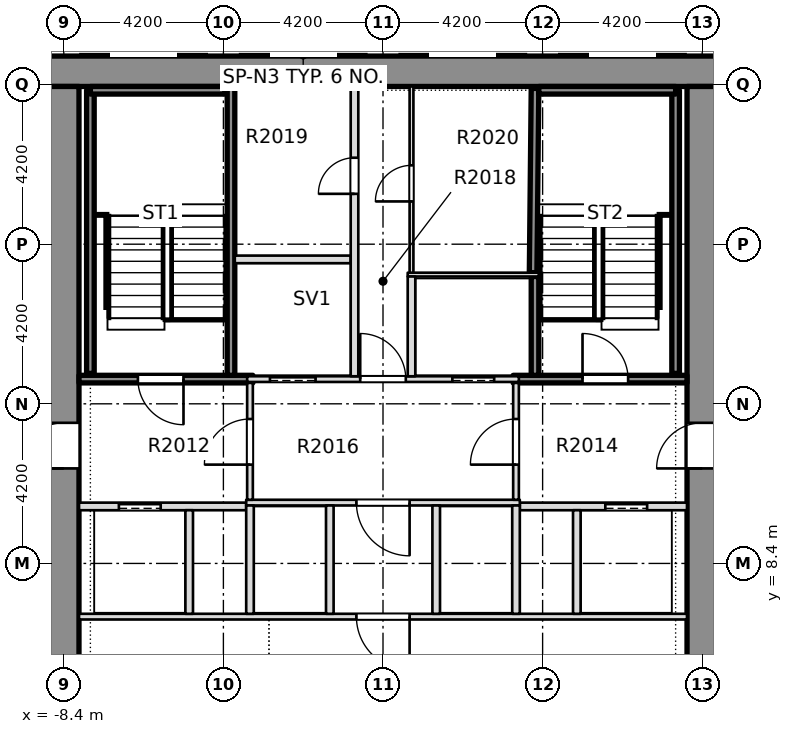
"""IFC4 building model, lengths in metres.
Left out: names, types, materials, properties, quantities, classifications, styles, units other than length and angle.
Written with IfcOpenShell. Run it as: python <this file> out.ifc"""

import sys

from ifc_helpers import new_model, si_unit, direction, frame, frame_2d, origin, place, context, subcontext, project, spatial, rectangle, extrude, element, fill, save


model = new_model("IFC4")
c1 = context("Model", 3, precision=1e-05, world=origin(), true_north=direction((0.0, 1.0)))
c2 = subcontext(c1, "Body", "Model", "MODEL_VIEW")
j1 = project(units=[si_unit("LENGTHUNIT", "METRE"), si_unit("PLANEANGLEUNIT", "RADIAN")], contexts=[c1])
p1 = place(None, origin())
s1 = spatial("IfcSite", under=j1, at=p1, CompositionType="ELEMENT")
p2 = place(p1, origin())
s2 = spatial("IfcBuilding", under=s1, at=p2, CompositionType="ELEMENT")
p3 = place(p2, frame((0.0, 0.0, 83.85)))
s3 = spatial("IfcBuildingStorey", under=s2, at=p3, CompositionType="ELEMENT", Elevation=83.85)
p4 = place(p3, frame((-11.8, 21.35, -0.32), z_axis=(0.0, 0.0, 1.0), x_axis=(1.0, 0.0, 0.0)))
e1 = element("IfcWall", 1, at=p4, inside=s3, PredefinedType="SHEAR", context=c2, shape_type="SweptSolid", body=[
    extrude(rectangle(XDim=23.6, YDim=0.8, at=frame_2d((11.8, 0.0))), origin(), (0.0, 0.0, 1.0), 3.45),
])
p5 = place(p3, frame((-8.4, -7.6, -0.32), z_axis=(0.0, 0.0, 1.0), x_axis=(0.0, 1.0, 0.0)))
e2 = element("IfcWall", 2, at=p5, inside=s3, PredefinedType="SHEAR", context=c2, shape_type="SweptSolid", body=[
    extrude(rectangle(XDim=28.55, YDim=0.8, at=frame_2d((14.275, 0.0))), origin(), (0.0, 0.0, 1.0), 3.45),
])
p6 = place(p5, frame((18.5, 0.0, 0.32)))
e3 = element("IfcOpeningElement", 3, at=p6, cuts=e2, PredefinedType="OPENING", context=c2, shape_type="SweptSolid", body=[
    extrude(rectangle(XDim=1.2, YDim=2.1, at=frame_2d((0.6, 1.05))), frame((0.0, 0.41, 0.0), z_axis=(0.0, -1.0, 0.0), x_axis=(1.0, 0.0, 0.0)), (0.0, 0.0, 1.0), 0.82),
])
p7 = place(p3, frame((8.4, -7.6, -0.32), z_axis=(0.0, 0.0, 1.0), x_axis=(0.0, 1.0, 0.0)))
e4 = element("IfcWall", 4, at=p7, inside=s3, PredefinedType="SHEAR", context=c2, shape_type="SweptSolid", body=[
    extrude(rectangle(XDim=28.55, YDim=0.8, at=frame_2d((14.275, 0.0))), origin(), (0.0, 0.0, 1.0), 3.45),
])
p8 = place(p7, frame((18.5, 0.0, 0.32)))
e5 = element("IfcOpeningElement", 5, at=p8, cuts=e4, PredefinedType="OPENING", context=c2, shape_type="SweptSolid", body=[
    extrude(rectangle(XDim=1.2, YDim=2.1, at=frame_2d((0.6, 1.05))), frame((0.0, 0.41, 0.0), z_axis=(0.0, -1.0, 0.0), x_axis=(1.0, 0.0, 0.0)), (0.0, 0.0, 1.0), 0.82),
])
p9 = place(p3, frame((-7.999, 7.0, 0.0), z_axis=(0.0, 0.0, 1.0), x_axis=(1.0, 0.0, 0.0)))
e6 = element("IfcWall", 6, at=p9, inside=s3, PredefinedType="PARTITIONING", context=c2, shape_type="SweptSolid", body=[
    extrude(rectangle(XDim=15.998, YDim=0.15, at=frame_2d((7.999, 0.0))), origin(), (0.0, 0.0, 1.0), 3.13),
])
p10 = place(p9, frame((7.299, 0.0, 0.0)))
e7 = element("IfcOpeningElement", 7, at=p10, cuts=e6, PredefinedType="OPENING", context=c2, shape_type="SweptSolid", body=[
    extrude(rectangle(XDim=1.4, YDim=2.1, at=frame_2d((0.7, 1.05))), frame((0.0, 0.085, 0.0), z_axis=(0.0, -1.0, 0.0), x_axis=(1.0, 0.0, 0.0)), (0.0, 0.0, 1.0), 0.17),
])
p11 = place(p3, frame((-7.999, 9.9, 0.0), z_axis=(0.0, 0.0, 1.0), x_axis=(1.0, 0.0, 0.0)))
e8 = element("IfcWall", 8, at=p11, inside=s3, PredefinedType="PARTITIONING", context=c2, shape_type="SweptSolid", body=[
    extrude(rectangle(XDim=4.399, YDim=0.2, at=frame_2d((2.199, 0.0))), origin(), (0.0, 0.0, 1.0), 3.13),
])
p12 = place(p11, frame((1.049, 0.0, 0.0)))
e9 = element("IfcOpeningElement", 9, at=p12, cuts=e8, PredefinedType="OPENING", context=c2, shape_type="SweptSolid", body=[
    extrude(rectangle(XDim=1.1, YDim=2.1, at=frame_2d((0.55, 1.05))), frame((0.0, 0.11, 0.0), z_axis=(0.0, -1.0, 0.0), x_axis=(1.0, 0.0, 0.0)), (0.0, 0.0, 1.0), 0.22),
])
p13 = place(p3, frame((3.6, 9.9, 0.0), z_axis=(0.0, 0.0, 1.0), x_axis=(1.0, 0.0, 0.0)))
e10 = element("IfcWall", 10, at=p13, inside=s3, PredefinedType="PARTITIONING", context=c2, shape_type="SweptSolid", body=[
    extrude(rectangle(XDim=4.399, YDim=0.2, at=frame_2d((2.199, 0.0))), origin(), (0.0, 0.0, 1.0), 3.13),
])
p14 = place(p13, frame((2.25, 0.0, 0.0)))
e11 = element("IfcOpeningElement", 11, at=p14, cuts=e10, PredefinedType="OPENING", context=c2, shape_type="SweptSolid", body=[
    extrude(rectangle(XDim=1.1, YDim=2.1, at=frame_2d((0.55, 1.05))), frame((0.0, 0.11, 0.0), z_axis=(0.0, -1.0, 0.0), x_axis=(1.0, 0.0, 0.0)), (0.0, 0.0, 1.0), 0.22),
])
p15 = place(p3, frame((-3.6, 10.0, 0.0), z_axis=(0.0, 0.0, 1.0), x_axis=(1.0, 0.0, 0.0)))
e12 = element("IfcWall", 12, at=p15, inside=s3, PredefinedType="PARTITIONING", context=c2, shape_type="SweptSolid", body=[
    extrude(rectangle(XDim=7.2, YDim=0.15, at=frame_2d((3.6, 0.0))), origin(), (0.0, 0.0, 1.0), 3.13),
])
p16 = place(p15, frame((2.9, 0.0, 0.0)))
e13 = element("IfcOpeningElement", 13, at=p16, cuts=e12, PredefinedType="OPENING", context=c2, shape_type="SweptSolid", body=[
    extrude(rectangle(XDim=1.4, YDim=2.1, at=frame_2d((0.7, 1.05))), frame((0.0, 0.085, 0.0), z_axis=(0.0, -1.0, 0.0), x_axis=(1.0, 0.0, 0.0)), (0.0, 0.0, 1.0), 0.17),
])
p17 = place(p3, frame((-7.999, 13.25, 0.0), z_axis=(0.0, 0.0, 1.0), x_axis=(1.0, 0.0, 0.0)))
e14 = element("IfcWall", 14, at=p17, inside=s3, PredefinedType="SOLIDWALL", context=c2, shape_type="SweptSolid", body=[
    extrude(rectangle(XDim=4.574, YDim=0.2, at=frame_2d((2.287, 0.0))), origin(), (0.0, 0.0, 1.0), 3.13),
])
p18 = place(p17, frame((1.549, 0.0, 0.0)))
e15 = element("IfcOpeningElement", 15, at=p18, cuts=e14, PredefinedType="OPENING", context=c2, shape_type="SweptSolid", body=[
    extrude(rectangle(XDim=1.2, YDim=2.1, at=frame_2d((0.6, 1.05))), frame((0.0, 0.11, 0.0), z_axis=(0.0, -1.0, 0.0), x_axis=(1.0, 0.0, 0.0)), (0.0, 0.0, 1.0), 0.22),
])
p19 = place(p3, frame((-3.575, 13.25, 0.0), z_axis=(0.0, 0.0, 1.0), x_axis=(1.0, 0.0, 0.0)))
e16 = element("IfcWall", 16, at=p19, inside=s3, PredefinedType="PARTITIONING", context=c2, shape_type="SweptSolid", body=[
    extrude(rectangle(XDim=7.15, YDim=0.15, at=frame_2d((3.575, 0.0))), origin(), (0.0, 0.0, 1.0), 3.13),
])
p20 = place(p19, frame((0.6, 0.0, 0.0)))
e17 = element("IfcOpeningElement", 17, at=p20, cuts=e16, PredefinedType="OPENING", context=c2, shape_type="SweptSolid", body=[
    extrude(rectangle(XDim=1.2, YDim=2.1, at=frame_2d((0.6, 1.05))), frame((0.0, 0.085, 0.0), z_axis=(0.0, -1.0, 0.0), x_axis=(1.0, 0.0, 0.0)), (0.0, 0.0, 1.0), 0.17),
])
p21 = place(p19, frame((5.4, 0.0, 0.0)))
e18 = element("IfcOpeningElement", 18, at=p21, cuts=e16, PredefinedType="OPENING", context=c2, shape_type="SweptSolid", body=[
    extrude(rectangle(XDim=1.1, YDim=2.1, at=frame_2d((0.55, 1.05))), frame((0.0, 0.085, 0.0), z_axis=(0.0, -1.0, 0.0), x_axis=(1.0, 0.0, 0.0)), (0.0, 0.0, 1.0), 0.17),
])
p22 = place(p19, frame((2.975, 0.0, 0.0)))
e19 = element("IfcOpeningElement", 19, at=p22, cuts=e16, PredefinedType="OPENING", context=c2, shape_type="SweptSolid", body=[
    extrude(rectangle(XDim=1.2, YDim=2.1, at=frame_2d((0.6, 1.05))), frame((0.0, 0.085, 0.0), z_axis=(0.0, -1.0, 0.0), x_axis=(1.0, 0.0, 0.0)), (0.0, 0.0, 1.0), 0.17),
])
p23 = place(p3, frame((3.425, 13.25, 0.0), z_axis=(0.0, 0.0, 1.0), x_axis=(1.0, 0.0, 0.0)))
e20 = element("IfcWall", 20, at=p23, inside=s3, PredefinedType="SOLIDWALL", context=c2, shape_type="SweptSolid", body=[
    extrude(rectangle(XDim=4.574, YDim=0.2, at=frame_2d((2.287, 0.0))), origin(), (0.0, 0.0, 1.0), 3.13),
])
p24 = place(p23, frame((1.825, 0.0, 0.0)))
e21 = element("IfcOpeningElement", 21, at=p24, cuts=e20, PredefinedType="OPENING", context=c2, shape_type="SweptSolid", body=[
    extrude(rectangle(XDim=1.2, YDim=2.1, at=frame_2d((0.6, 1.05))), frame((0.0, 0.11, 0.0), z_axis=(0.0, -1.0, 0.0), x_axis=(1.0, 0.0, 0.0)), (0.0, 0.0, 1.0), 0.22),
])
p25 = place(p3, frame((0.65, 16.0, 0.0), z_axis=(0.0, 0.0, 1.0), x_axis=(1.0, 0.0, 0.0)))
e22 = element("IfcWall", 22, at=p25, inside=s3, PredefinedType="PARTITIONING", context=c2, shape_type="SweptSolid", body=[
    extrude(rectangle(XDim=3.45, YDim=0.1, at=frame_2d((1.725, 0.0))), origin(), (0.0, 0.0, 1.0), 3.13),
])
p26 = place(p3, frame((-3.9, 16.4, 0.0), z_axis=(0.0, 0.0, 1.0), x_axis=(1.0, 0.0, 0.0)))
e23 = element("IfcWall", 23, at=p26, inside=s3, PredefinedType="PARTITIONING", context=c2, shape_type="SweptSolid", body=[
    extrude(rectangle(XDim=3.05, YDim=0.2, at=frame_2d((1.525, 0.0))), origin(), (0.0, 0.0, 1.0), 3.13),
])
p27 = place(p3, frame((-5.1, 7.075, 0.0), z_axis=(0.0, 0.0, 1.0), x_axis=(0.0, 1.0, 0.0)))
e24 = element("IfcWall", 24, at=p27, inside=s3, PredefinedType="PARTITIONING", context=c2, shape_type="SweptSolid", body=[
    extrude(rectangle(XDim=2.725, YDim=0.2, at=frame_2d((1.363, 0.0))), origin(), (0.0, 0.0, 1.0), 3.13),
])
p28 = place(p3, frame((-4.0, 13.35, 0.0), z_axis=(0.0, 0.0, 1.0), x_axis=(0.0, 1.0, 0.0)))
e25 = element("IfcWall", 25, at=p28, inside=s3, PredefinedType="SOLIDWALL", context=c2, shape_type="SweptSolid", body=[
    extrude(rectangle(XDim=7.599, YDim=0.2, at=frame_2d((3.799, 0.0))), origin(), (0.0, 0.0, 1.0), 3.13),
])
p29 = place(p3, frame((-3.5, 7.075, 0.0), z_axis=(0.0, 0.0, 1.0), x_axis=(0.0, 1.0, 0.0)))
e26 = element("IfcWall", 26, at=p29, inside=s3, PredefinedType="PARTITIONING", context=c2, shape_type="SweptSolid", body=[
    extrude(rectangle(XDim=2.85, YDim=0.2, at=frame_2d((1.425, 0.0))), origin(), (0.0, 0.0, 1.0), 3.13),
])
p30 = place(p3, frame((-3.5, 10.075, 0.0), z_axis=(0.0, 0.0, 1.0), x_axis=(0.0, 1.0, 0.0)))
e27 = element("IfcWall", 27, at=p30, inside=s3, PredefinedType="PARTITIONING", context=c2, shape_type="SweptSolid", body=[
    extrude(rectangle(XDim=3.075, YDim=0.15, at=frame_2d((1.538, 0.0))), origin(), (0.0, 0.0, 1.0), 3.13),
])
p31 = place(p30, frame((0.925, 0.0, 0.0)))
e28 = element("IfcOpeningElement", 28, at=p31, cuts=e27, PredefinedType="OPENING", context=c2, shape_type="SweptSolid", body=[
    extrude(rectangle(XDim=1.2, YDim=2.1, at=frame_2d((0.6, 1.05))), frame((0.0, 0.085, 0.0), z_axis=(0.0, -1.0, 0.0), x_axis=(1.0, 0.0, 0.0)), (0.0, 0.0, 1.0), 0.17),
])
p32 = place(p3, frame((-1.4, 7.075, 0.0), z_axis=(0.0, 0.0, 1.0), x_axis=(0.0, 1.0, 0.0)))
e29 = element("IfcWall", 29, at=p32, inside=s3, PredefinedType="PARTITIONING", context=c2, shape_type="SweptSolid", body=[
    extrude(rectangle(XDim=2.85, YDim=0.2, at=frame_2d((1.425, 0.0))), origin(), (0.0, 0.0, 1.0), 3.13),
])
p33 = place(p3, frame((-0.75, 13.325, 0.0), z_axis=(0.0, 0.0, 1.0), x_axis=(0.0, 1.0, 0.0)))
e30 = element("IfcWall", 30, at=p33, inside=s3, PredefinedType="PARTITIONING", context=c2, shape_type="SweptSolid", body=[
    extrude(rectangle(XDim=7.624, YDim=0.2, at=frame_2d((3.812, 0.0))), origin(), (0.0, 0.0, 1.0), 3.13),
])
p34 = place(p33, frame((4.8, 0.0, 0.0)))
e31 = element("IfcOpeningElement", 31, at=p34, cuts=e30, PredefinedType="OPENING", context=c2, shape_type="SweptSolid", body=[
    extrude(rectangle(XDim=0.95, YDim=2.1, at=frame_2d((0.475, 1.05))), frame((0.0, 0.11, 0.0), z_axis=(0.0, -1.0, 0.0), x_axis=(1.0, 0.0, 0.0)), (0.0, 0.0, 1.0), 0.22),
])
p35 = place(p3, frame((0.75, 13.325, 0.0), z_axis=(0.0, 0.0, 1.0), x_axis=(0.0, 1.0, 0.0)))
e32 = element("IfcWall", 32, at=p35, inside=s3, PredefinedType="PARTITIONING", context=c2, shape_type="SweptSolid", body=[
    extrude(rectangle(XDim=2.625, YDim=0.2, at=frame_2d((1.312, 0.0))), origin(), (0.0, 0.0, 1.0), 3.13),
])
p36 = place(p3, frame((0.75, 16.05, 0.0), z_axis=(0.0, 0.0, 1.0), x_axis=(0.0, 1.0, 0.0)))
e33 = element("IfcWall", 33, at=p36, inside=s3, PredefinedType="PARTITIONING", context=c2, shape_type="SweptSolid", body=[
    extrude(rectangle(XDim=4.899, YDim=0.1, at=frame_2d((2.449, 0.0))), origin(), (0.0, 0.0, 1.0), 3.13),
])
p37 = place(p36, frame((1.875, 0.0, 0.0)))
e34 = element("IfcOpeningElement", 34, at=p37, cuts=e33, PredefinedType="OPENING", context=c2, shape_type="SweptSolid", body=[
    extrude(rectangle(XDim=0.95, YDim=2.1, at=frame_2d((0.475, 1.05))), frame((0.0, 0.06, 0.0), z_axis=(0.0, -1.0, 0.0), x_axis=(1.0, 0.0, 0.0)), (0.0, 0.0, 1.0), 0.12),
])
for number, where, z_axis, x_axis in (
    (35, (1.4, 7.075, 0.0), (0.0, 0.0, 1.0), (0.0, 1.0, 0.0)),
    (36, (3.5, 7.075, 0.0), (0.0, 0.0, 1.0), (0.0, 1.0, 0.0)),
):
    element("IfcWall", number, at=place(p3, frame(where, z_axis=z_axis, x_axis=x_axis)), inside=s3, PredefinedType="PARTITIONING", context=c2, shape_type="SweptSolid", body=[
        extrude(rectangle(XDim=2.85, YDim=0.2, at=frame_2d((1.425, 0.0))), origin(), (0.0, 0.0, 1.0), 3.13),
    ])
p38 = place(p3, frame((3.5, 10.075, 0.0), z_axis=(0.0, 0.0, 1.0), x_axis=(0.0, 1.0, 0.0)))
e37 = element("IfcWall", 37, at=p38, inside=s3, PredefinedType="PARTITIONING", context=c2, shape_type="SweptSolid", body=[
    extrude(rectangle(XDim=3.075, YDim=0.15, at=frame_2d((1.538, 0.0))), origin(), (0.0, 0.0, 1.0), 3.13),
])
p39 = place(p38, frame((0.925, 0.0, 0.0)))
e38 = element("IfcOpeningElement", 38, at=p39, cuts=e37, PredefinedType="OPENING", context=c2, shape_type="SweptSolid", body=[
    extrude(rectangle(XDim=1.2, YDim=2.1, at=frame_2d((0.6, 1.05))), frame((0.0, 0.085, 0.0), z_axis=(0.0, -1.0, 0.0), x_axis=(1.0, 0.0, 0.0)), (0.0, 0.0, 1.0), 0.17),
])
p40 = place(p3, frame((4.0, 13.35, 0.0), z_axis=(0.0, 0.0, 1.0), x_axis=(0.0, 1.0, 0.0)))
e39 = element("IfcWall", 39, at=p40, inside=s3, PredefinedType="SOLIDWALL", context=c2, shape_type="SweptSolid", body=[
    extrude(rectangle(XDim=2.6, YDim=0.2, at=frame_2d((1.3, 0.0))), origin(), (0.0, 0.0, 1.0), 3.13),
])
p41 = place(p3, frame((3.95, 16.05, 0.0), z_axis=(0.0, 0.0, 1.0), x_axis=(0.01032118628, 0.999946735138, 0.0)))
e40 = element("IfcWall", 40, at=p41, inside=s3, PredefinedType="SOLIDWALL", context=c2, shape_type="SweptSolid", body=[
    extrude(rectangle(XDim=4.849, YDim=0.2, at=frame_2d((2.425, 0.0))), origin(), (0.0, 0.0, 1.0), 3.13),
])
p42 = place(p3, frame((5.1, 7.075, 0.0), z_axis=(0.0, 0.0, 1.0), x_axis=(0.0, 1.0, 0.0)))
e41 = element("IfcWall", 41, at=p42, inside=s3, PredefinedType="PARTITIONING", context=c2, shape_type="SweptSolid", body=[
    extrude(rectangle(XDim=2.725, YDim=0.2, at=frame_2d((1.363, 0.0))), origin(), (0.0, 0.0, 1.0), 3.13),
])
p43 = place(p3, frame((-7.7, 13.4, 0.0), z_axis=(0.0, 0.0, 1.0), x_axis=(0.0, 1.0, 0.0)))
e42 = element("IfcWall", 42, at=p43, inside=s3, PredefinedType="SOLIDWALL", context=c2, shape_type="SweptSolid", body=[
    extrude(rectangle(XDim=7.45, YDim=0.2, at=frame_2d((3.725, 0.0))), origin(), (0.0, 0.0, 1.0), 3.13),
])
p44 = place(p3, frame((-7.7, 20.85, 0.0), z_axis=(0.0, 0.0, 1.0), x_axis=(1.0, 0.0, 0.0)))
e43 = element("IfcWall", 43, at=p44, inside=s3, PredefinedType="SOLIDWALL", context=c2, shape_type="SweptSolid", body=[
    extrude(rectangle(XDim=3.55, YDim=0.2, at=frame_2d((1.775, 0.0))), origin(), (0.0, 0.0, 1.0), 3.13),
])
p45 = place(p3, frame((7.7, 13.4, 0.0), z_axis=(0.0, 0.0, 1.0), x_axis=(0.0, 1.0, 0.0)))
e44 = element("IfcWall", 44, at=p45, inside=s3, PredefinedType="SOLIDWALL", context=c2, shape_type="SweptSolid", body=[
    extrude(rectangle(XDim=7.45, YDim=0.2, at=frame_2d((3.725, 0.0))), origin(), (0.0, 0.0, 1.0), 3.13),
])
p46 = place(p3, frame((4.1, 20.85, 0.0), z_axis=(0.0, 0.0, 1.0), x_axis=(1.0, 0.0, 0.0)))
e45 = element("IfcWall", 45, at=p46, inside=s3, PredefinedType="SOLIDWALL", context=c2, shape_type="SweptSolid", body=[
    extrude(rectangle(XDim=3.6, YDim=0.2, at=frame_2d((1.8, 0.0))), origin(), (0.0, 0.0, 1.0), 3.13),
])
p47 = place(p18, origin())
e46 = element("IfcDoor", 46, at=p47, inside=s3, OperationType="SINGLE_SWING_LEFT", PredefinedType="DOOR", context=c2, shape_type="SweptSolid", body=[
    extrude(rectangle(XDim=1.2, YDim=2.1, at=frame_2d((0.6, 1.05))), frame((0.0, 0.025, 0.0), z_axis=(0.0, -1.0, 0.0), x_axis=(1.0, 0.0, 0.0)), (0.0, 0.0, 1.0), 0.05),
])
fill(e15, e46)
p48 = place(p12, origin())
e47 = element("IfcDoor", 47, at=p48, inside=s3, OperationType="SLIDING_TO_LEFT", PredefinedType="DOOR", context=c2, shape_type="SweptSolid", body=[
    extrude(rectangle(XDim=1.1, YDim=2.1, at=frame_2d((0.55, 1.05))), frame((0.0, 0.025, 0.0), z_axis=(0.0, -1.0, 0.0), x_axis=(1.0, 0.0, 0.0)), (0.0, 0.0, 1.0), 0.05),
])
fill(e9, e47)
p49 = place(p24, origin())
e48 = element("IfcDoor", 48, at=p49, inside=s3, OperationType="SINGLE_SWING_RIGHT", PredefinedType="DOOR", context=c2, shape_type="SweptSolid", body=[
    extrude(rectangle(XDim=1.2, YDim=2.1, at=frame_2d((0.6, 1.05))), frame((0.0, 0.025, 0.0), z_axis=(0.0, -1.0, 0.0), x_axis=(1.0, 0.0, 0.0)), (0.0, 0.0, 1.0), 0.05),
])
fill(e21, e48)
p50 = place(p14, origin())
e49 = element("IfcDoor", 49, at=p50, inside=s3, OperationType="SLIDING_TO_LEFT", PredefinedType="DOOR", context=c2, shape_type="SweptSolid", body=[
    extrude(rectangle(XDim=1.1, YDim=2.1, at=frame_2d((0.55, 1.05))), frame((0.0, 0.025, 0.0), z_axis=(0.0, -1.0, 0.0), x_axis=(1.0, 0.0, 0.0)), (0.0, 0.0, 1.0), 0.05),
])
fill(e11, e49)
p51 = place(p10, origin())
e50 = element("IfcDoor", 50, at=p51, inside=s3, OperationType="SINGLE_SWING_RIGHT", PredefinedType="DOOR", context=c2, shape_type="SweptSolid", body=[
    extrude(rectangle(XDim=1.4, YDim=2.1, at=frame_2d((0.7, 1.05))), frame((0.0, 0.025, 0.0), z_axis=(0.0, -1.0, 0.0), x_axis=(1.0, 0.0, 0.0)), (0.0, 0.0, 1.0), 0.05),
])
fill(e7, e50)
p52 = place(p16, origin())
e51 = element("IfcDoor", 51, at=p52, inside=s3, OperationType="SINGLE_SWING_RIGHT", PredefinedType="DOOR", context=c2, shape_type="SweptSolid", body=[
    extrude(rectangle(XDim=1.4, YDim=2.1, at=frame_2d((0.7, 1.05))), frame((0.0, 0.025, 0.0), z_axis=(0.0, -1.0, 0.0), x_axis=(1.0, 0.0, 0.0)), (0.0, 0.0, 1.0), 0.05),
])
fill(e13, e51)
p53 = place(p20, origin())
e52 = element("IfcDoor", 52, at=p53, inside=s3, OperationType="SLIDING_TO_RIGHT", PredefinedType="DOOR", context=c2, shape_type="SweptSolid", body=[
    extrude(rectangle(XDim=1.2, YDim=2.1, at=frame_2d((0.6, 1.05))), frame((0.0, 0.025, 0.0), z_axis=(0.0, -1.0, 0.0), x_axis=(1.0, 0.0, 0.0)), (0.0, 0.0, 1.0), 0.05),
])
fill(e17, e52)
p54 = place(p21, origin())
e53 = element("IfcDoor", 53, at=p54, inside=s3, OperationType="SLIDING_TO_LEFT", PredefinedType="DOOR", context=c2, shape_type="SweptSolid", body=[
    extrude(rectangle(XDim=1.1, YDim=2.1, at=frame_2d((0.55, 1.05))), frame((0.0, 0.025, 0.0), z_axis=(0.0, -1.0, 0.0), x_axis=(1.0, 0.0, 0.0)), (0.0, 0.0, 1.0), 0.05),
])
fill(e18, e53)
p55 = place(p22, origin())
e54 = element("IfcDoor", 54, at=p55, inside=s3, OperationType="SINGLE_SWING_RIGHT", PredefinedType="DOOR", context=c2, shape_type="SweptSolid", body=[
    extrude(rectangle(XDim=1.2, YDim=2.1, at=frame_2d((0.6, 1.05))), frame((0.0, 0.025, 0.0), z_axis=(0.0, -1.0, 0.0), x_axis=(1.0, 0.0, 0.0)), (0.0, 0.0, 1.0), 0.05),
])
fill(e19, e54)
p56 = place(p34, origin())
e55 = element("IfcDoor", 55, at=p56, inside=s3, OperationType="SINGLE_SWING_RIGHT", PredefinedType="DOOR", context=c2, shape_type="SweptSolid", body=[
    extrude(rectangle(XDim=0.95, YDim=2.1, at=frame_2d((0.475, 1.05))), frame((0.0, 0.025, 0.0), z_axis=(0.0, -1.0, 0.0), x_axis=(1.0, 0.0, 0.0)), (0.0, 0.0, 1.0), 0.05),
])
fill(e31, e55)
p57 = place(p37, origin())
e56 = element("IfcDoor", 56, at=p57, inside=s3, OperationType="SINGLE_SWING_LEFT", PredefinedType="DOOR", context=c2, shape_type="SweptSolid", body=[
    extrude(rectangle(XDim=0.95, YDim=2.1, at=frame_2d((0.475, 1.05))), frame((0.0, 0.025, 0.0), z_axis=(0.0, -1.0, 0.0), x_axis=(1.0, 0.0, 0.0)), (0.0, 0.0, 1.0), 0.05),
])
fill(e34, e56)
p58 = place(p31, origin())
e57 = element("IfcDoor", 57, at=p58, inside=s3, OperationType="SINGLE_SWING_RIGHT", PredefinedType="DOOR", context=c2, shape_type="SweptSolid", body=[
    extrude(rectangle(XDim=1.2, YDim=2.1, at=frame_2d((0.6, 1.05))), frame((0.0, 0.025, 0.0), z_axis=(0.0, -1.0, 0.0), x_axis=(1.0, 0.0, 0.0)), (0.0, 0.0, 1.0), 0.05),
])
fill(e28, e57)
p59 = place(p39, origin())
e58 = element("IfcDoor", 58, at=p59, inside=s3, OperationType="SINGLE_SWING_LEFT", PredefinedType="DOOR", context=c2, shape_type="SweptSolid", body=[
    extrude(rectangle(XDim=1.2, YDim=2.1, at=frame_2d((0.6, 1.05))), frame((0.0, 0.025, 0.0), z_axis=(0.0, -1.0, 0.0), x_axis=(1.0, 0.0, 0.0)), (0.0, 0.0, 1.0), 0.05),
])
fill(e38, e58)
p60 = place(p6, origin())
e59 = element("IfcDoor", 59, at=p60, inside=s3, OperationType="SINGLE_SWING_LEFT", PredefinedType="DOOR", context=c2, shape_type="SweptSolid", body=[
    extrude(rectangle(XDim=1.2, YDim=2.1, at=frame_2d((0.6, 1.05))), frame((0.0, 0.025, 0.0), z_axis=(0.0, -1.0, 0.0), x_axis=(1.0, 0.0, 0.0)), (0.0, 0.0, 1.0), 0.05),
])
fill(e3, e59)
p61 = place(p8, origin())
e60 = element("IfcDoor", 60, at=p61, inside=s3, OperationType="SINGLE_SWING_LEFT", PredefinedType="DOOR", context=c2, shape_type="SweptSolid", body=[
    extrude(rectangle(XDim=1.2, YDim=2.1, at=frame_2d((0.6, 1.05))), frame((0.0, 0.025, 0.0), z_axis=(0.0, -1.0, 0.0), x_axis=(1.0, 0.0, 0.0)), (0.0, 0.0, 1.0), 0.05),
])
fill(e5, e60)
save(model, sys.argv[1])
